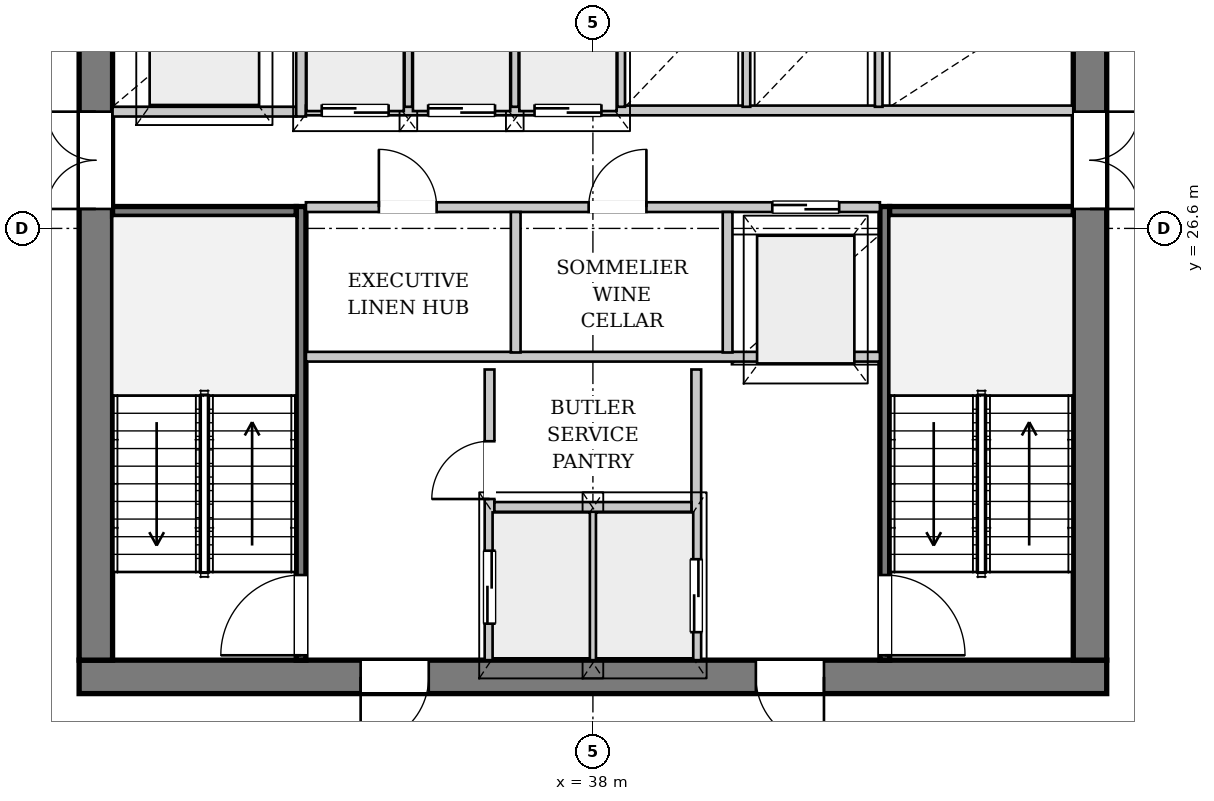
"""IFC4 building model, lengths in metres.
Left out: names, types, materials, properties, quantities, classifications, styles, units other than length and angle.
Written with IfcOpenShell. Run it as: python <this file> out.ifc"""

import sys

from ifc_helpers import new_model, si_unit, direction, frame, frame_2d, origin, place, context, subcontext, project, spatial, rectangle, extrude, source, transform, mapped, element, fill, save


model = new_model("IFC4")
c1 = context("Model", 3, precision=1e-05, world=origin(), true_north=direction((0.0, 1.0)))
c2 = subcontext(c1, "Body", "Model", "MODEL_VIEW")
j1 = project(units=[si_unit("LENGTHUNIT", "METRE"), si_unit("PLANEANGLEUNIT", "RADIAN")], contexts=[c1])
p1 = place(None, origin())
s1 = spatial("IfcSite", under=j1, at=p1, CompositionType="ELEMENT")
p2 = place(p1, origin())
s2 = spatial("IfcBuilding", under=s1, at=p2, CompositionType="ELEMENT")
p3 = place(p2, frame((0.0, 0.0, 182.1)))
s3 = spatial("IfcBuildingStorey", under=s2, at=p3, CompositionType="ELEMENT", Elevation=182.1)
p4 = place(p3, frame((53.031, 21.293, 0.0), z_axis=(0.0, 0.0, 1.0), x_axis=(-0.601886435851, -0.798581691713, 0.0)))
e1 = element("IfcWall", 1, at=p4, inside=s3, PredefinedType="SOLIDWALL", context=c2, shape_type="SweptSolid", body=[
    extrude(rectangle(XDim=23.316, YDim=0.32, at=frame_2d((11.658, 0.0))), origin(), (0.0, 0.0, 1.0), 2.722),
])
p5 = place(p4, frame((6.261, 0.0, 0.0)))
e2 = element("IfcOpeningElement", 2, at=p5, cuts=e1, PredefinedType="OPENING", context=c2, shape_type="SweptSolid", body=[
    extrude(rectangle(XDim=1.5, YDim=2.3, at=frame_2d((0.75, 1.15))), frame((0.0, 0.17, 0.0), z_axis=(0.0, -1.0, 0.0), x_axis=(1.0, 0.0, 0.0)), (0.0, 0.0, 1.0), 0.34),
])
p6 = place(p4, frame((15.954, 0.0, 0.252)))
e3 = element("IfcOpeningElement", 3, at=p6, cuts=e1, PredefinedType="OPENING", context=c2, shape_type="SweptSolid", body=[
    extrude(rectangle(XDim=2.6, YDim=2.35, at=frame_2d((1.3, 1.175))), frame((0.0, 0.17, 0.0), z_axis=(0.0, -1.0, 0.0), x_axis=(1.0, 0.0, 0.0)), (0.0, 0.0, 1.0), 0.34),
])
p7 = place(p3, frame((40.259, 2.746, 0.0), z_axis=(0.0, 0.0, 1.0), x_axis=(0.596468885173, 0.80263619967, 0.0)))
e4 = element("IfcWall", 4, at=p7, inside=s3, PredefinedType="PARAPET", context=c2, shape_type="SweptSolid", body=[
    extrude(rectangle(XDim=20.754, YDim=0.22, at=frame_2d((10.377, 0.0))), origin(), (0.0, 0.0, 1.0), 0.3),
])
p8 = place(p3, frame((46.45, 19.225, 0.0), z_axis=(0.0, 0.0, 1.0), x_axis=(-1.0, 0.0, 0.0)))
e5 = element("IfcWall", 5, at=p8, inside=s3, PredefinedType="SHEAR", context=c2, shape_type="SweptSolid", body=[
    extrude(rectangle(XDim=16.9, YDim=0.55, at=frame_2d((8.45, 0.0))), origin(), (0.0, 0.0, 1.0), 3.33),
])
p9 = place(p8, frame((4.65, 0.0, 0.0)))
e6 = element("IfcOpeningElement", 6, at=p9, cuts=e5, PredefinedType="OPENING", context=c2, shape_type="SweptSolid", body=[
    extrude(rectangle(XDim=1.12, YDim=2.25, at=frame_2d((0.56, 1.125))), frame((0.0, 0.285, 0.0), z_axis=(0.0, -1.0, 0.0), x_axis=(1.0, 0.0, 0.0)), (0.0, 0.0, 1.0), 0.57),
])
p10 = place(p8, frame((11.15, 0.0, 0.0)))
e7 = element("IfcOpeningElement", 7, at=p10, cuts=e5, PredefinedType="OPENING", context=c2, shape_type="SweptSolid", body=[
    extrude(rectangle(XDim=1.12, YDim=2.25, at=frame_2d((0.56, 1.125))), frame((0.0, 0.285, 0.0), z_axis=(0.0, -1.0, 0.0), x_axis=(1.0, 0.0, 0.0)), (0.0, 0.0, 1.0), 0.57),
])
p11 = place(p3, frame((29.825, 19.5, 0.0), z_axis=(0.0, 0.0, 1.0), x_axis=(0.0, 1.0, 0.0)))
e8 = element("IfcWall", 8, at=p11, inside=s3, PredefinedType="SHEAR", context=c2, shape_type="SweptSolid", body=[
    extrude(rectangle(XDim=14.2, YDim=0.55, at=frame_2d((7.1, 0.0))), origin(), (0.0, 0.0, 1.0), 3.33),
])
p12 = place(p11, frame((7.42, 0.0, 0.0)))
e9 = element("IfcOpeningElement", 9, at=p12, cuts=e8, PredefinedType="OPENING", context=c2, shape_type="SweptSolid", body=[
    extrude(rectangle(XDim=1.6, YDim=2.2, at=frame_2d((0.8, 1.1))), frame((0.0, 0.285, 0.0), z_axis=(0.0, -1.0, 0.0), x_axis=(1.0, 0.0, 0.0)), (0.0, 0.0, 1.0), 0.57),
])
p13 = place(p3, frame((46.175, 33.7, 0.0), z_axis=(0.0, 0.0, 1.0), x_axis=(0.0, -1.0, 0.0)))
e10 = element("IfcWall", 10, at=p13, inside=s3, PredefinedType="SHEAR", context=c2, shape_type="SweptSolid", body=[
    extrude(rectangle(XDim=14.2, YDim=0.55, at=frame_2d((7.1, 0.0))), origin(), (0.0, 0.0, 1.0), 3.33),
])
p14 = place(p13, frame((5.18, 0.0, 0.0)))
e11 = element("IfcOpeningElement", 11, at=p14, cuts=e10, PredefinedType="OPENING", context=c2, shape_type="SweptSolid", body=[
    extrude(rectangle(XDim=1.6, YDim=2.2, at=frame_2d((0.8, 1.1))), frame((0.0, 0.285, 0.0), z_axis=(0.0, -1.0, 0.0), x_axis=(1.0, 0.0, 0.0)), (0.0, 0.0, 1.0), 0.57),
])
p15 = place(p13, frame((2.05, 0.0, 0.0)))
e12 = element("IfcOpeningElement", 12, at=p15, cuts=e10, PredefinedType="OPENING", context=c2, shape_type="SweptSolid", body=[
    extrude(rectangle(XDim=0.95, YDim=2.1, at=frame_2d((0.475, 1.05))), frame((0.0, 0.285, 0.0), z_axis=(0.0, -1.0, 0.0), x_axis=(1.0, 0.0, 0.0)), (0.0, 0.0, 1.0), 0.57),
])
p16 = place(p3, frame((33.2, 19.5, 0.0), z_axis=(0.0, 0.0, 1.0), x_axis=(0.0, 1.0, 0.0)))
e13 = element("IfcWall", 13, at=p16, inside=s3, PredefinedType="PARTITIONING", context=c2, shape_type="SweptSolid", body=[
    extrude(rectangle(XDim=7.46, YDim=0.16, at=frame_2d((3.73, 0.0))), origin(), (0.0, 0.0, 1.0), 3.33),
])
p17 = place(p16, frame((0.08, 0.0, 0.0)))
e14 = element("IfcOpeningElement", 14, at=p17, cuts=e13, PredefinedType="OPENING", context=c2, shape_type="SweptSolid", body=[
    extrude(rectangle(XDim=1.32, YDim=2.2, at=frame_2d((0.66, 1.1))), frame((0.0, 0.09, 0.0), z_axis=(0.0, -1.0, 0.0), x_axis=(1.0, 0.0, 0.0)), (0.0, 0.0, 1.0), 0.18),
])
p18 = place(p3, frame((30.1, 26.88, 0.0), z_axis=(0.0, 0.0, 1.0), x_axis=(1.0, 0.0, 0.0)))
e15 = element("IfcWall", 15, at=p18, inside=s3, PredefinedType="PARTITIONING", context=c2, shape_type="SweptSolid", body=[
    extrude(rectangle(XDim=3.02, YDim=0.16, at=frame_2d((1.51, 0.0))), origin(), (0.0, 0.0, 1.0), 3.33),
])
p19 = place(p3, frame((42.8, 26.96, 0.0), z_axis=(0.0, 0.0, 1.0), x_axis=(0.0, -1.0, 0.0)))
e16 = element("IfcWall", 16, at=p19, inside=s3, PredefinedType="PARTITIONING", context=c2, shape_type="SweptSolid", body=[
    extrude(rectangle(XDim=7.46, YDim=0.16, at=frame_2d((3.73, 0.0))), origin(), (0.0, 0.0, 1.0), 3.33),
])
p20 = place(p19, frame((6.06, 0.0, 0.0)))
e17 = element("IfcOpeningElement", 17, at=p20, cuts=e16, PredefinedType="OPENING", context=c2, shape_type="SweptSolid", body=[
    extrude(rectangle(XDim=1.32, YDim=2.2, at=frame_2d((0.66, 1.1))), frame((0.0, 0.09, 0.0), z_axis=(0.0, -1.0, 0.0), x_axis=(1.0, 0.0, 0.0)), (0.0, 0.0, 1.0), 0.18),
])
p21 = place(p3, frame((42.88, 26.88, 0.0), z_axis=(0.0, 0.0, 1.0), x_axis=(1.0, 0.0, 0.0)))
e18 = element("IfcWall", 18, at=p21, inside=s3, PredefinedType="PARTITIONING", context=c2, shape_type="SweptSolid", body=[
    extrude(rectangle(XDim=3.02, YDim=0.16, at=frame_2d((1.51, 0.0))), origin(), (0.0, 0.0, 1.0), 3.33),
])
p22 = place(p3, frame((36.3, 19.5, 0.0), z_axis=(0.0, 0.0, 1.0), x_axis=(0.0, 1.0, 0.0)))
e19 = element("IfcWall", 19, at=p22, inside=s3, PredefinedType="PARTITIONING", context=c2, shape_type="SweptSolid", body=[
    extrude(rectangle(XDim=4.78, YDim=0.16, at=frame_2d((2.39, 0.0))), origin(), (0.0, 0.0, 1.0), 3.33),
])
p23 = place(p22, frame((0.6, 0.0, 0.0)))
e20 = element("IfcOpeningElement", 20, at=p23, cuts=e19, PredefinedType="OPENING", context=c2, shape_type="SweptSolid", body=[
    extrude(rectangle(XDim=1.2, YDim=2.2, at=frame_2d((0.6, 1.1))), frame((0.0, 0.09, 0.0), z_axis=(0.0, -1.0, 0.0), x_axis=(1.0, 0.0, 0.0)), (0.0, 0.0, 1.0), 0.18),
])
p24 = place(p22, frame((2.65, 0.0, 0.0)))
e21 = element("IfcOpeningElement", 21, at=p24, cuts=e19, PredefinedType="OPENING", context=c2, shape_type="SweptSolid", body=[
    extrude(rectangle(XDim=0.95, YDim=2.1, at=frame_2d((0.475, 1.05))), frame((0.0, 0.09, 0.0), z_axis=(0.0, -1.0, 0.0), x_axis=(1.0, 0.0, 0.0)), (0.0, 0.0, 1.0), 0.18),
])
p25 = place(p3, frame((39.7, 24.28, 0.0), z_axis=(0.0, 0.0, 1.0), x_axis=(0.0, -1.0, 0.0)))
e22 = element("IfcWall", 22, at=p25, inside=s3, PredefinedType="PARTITIONING", context=c2, shape_type="SweptSolid", body=[
    extrude(rectangle(XDim=4.78, YDim=0.16, at=frame_2d((2.39, 0.0))), origin(), (0.0, 0.0, 1.0), 3.33),
])
p26 = place(p25, frame((3.12, 0.0, 0.0)))
e23 = element("IfcOpeningElement", 23, at=p26, cuts=e22, PredefinedType="OPENING", context=c2, shape_type="SweptSolid", body=[
    extrude(rectangle(XDim=1.2, YDim=2.2, at=frame_2d((0.6, 1.1))), frame((0.0, 0.09, 0.0), z_axis=(0.0, -1.0, 0.0), x_axis=(1.0, 0.0, 0.0)), (0.0, 0.0, 1.0), 0.18),
])
p27 = place(p3, frame((38.0, 19.5, 0.0), z_axis=(0.0, 0.0, 1.0), x_axis=(0.0, 1.0, 0.0)))
e24 = element("IfcWall", 24, at=p27, inside=s3, PredefinedType="PARTITIONING", context=c2, shape_type="SweptSolid", body=[
    extrude(rectangle(XDim=2.46, YDim=0.125, at=frame_2d((1.23, 0.0))), origin(), (0.0, 0.0, 1.0), 3.33),
])
p28 = place(p3, frame((36.38, 22.02, 0.0), z_axis=(0.0, 0.0, 1.0), x_axis=(1.0, 0.0, 0.0)))
e25 = element("IfcWall", 25, at=p28, inside=s3, PredefinedType="PARTITIONING", context=c2, shape_type="SweptSolid", body=[
    extrude(rectangle(XDim=3.24, YDim=0.16, at=frame_2d((1.62, 0.0))), origin(), (0.0, 0.0, 1.0), 3.33),
])
p29 = place(p3, frame((33.28, 24.49, 0.0), z_axis=(0.0, 0.0, 1.0), x_axis=(1.0, 0.0, 0.0)))
e26 = element("IfcWall", 26, at=p29, inside=s3, PredefinedType="PARTITIONING", context=c2, shape_type="SweptSolid", body=[
    extrude(rectangle(XDim=9.44, YDim=0.16, at=frame_2d((4.72, 0.0))), origin(), (0.0, 0.0, 1.0), 3.33),
])
p30 = place(p3, frame((30.1, 28.52, 0.0), z_axis=(0.0, 0.0, 1.0), x_axis=(1.0, 0.0, 0.0)))
e27 = element("IfcWall", 27, at=p30, inside=s3, PredefinedType="PARTITIONING", context=c2, shape_type="SweptSolid", body=[
    extrude(rectangle(XDim=3.02, YDim=0.16, at=frame_2d((1.51, 0.0))), origin(), (0.0, 0.0, 1.0), 3.33),
])
p31 = place(p3, frame((33.2, 28.44, 0.0), z_axis=(0.0, 0.0, 1.0), x_axis=(0.0, 1.0, 0.0)))
e28 = element("IfcWall", 28, at=p31, inside=s3, PredefinedType="PARTITIONING", context=c2, shape_type="SweptSolid", body=[
    extrude(rectangle(XDim=5.26, YDim=0.16, at=frame_2d((2.63, 0.0))), origin(), (0.0, 0.0, 1.0), 3.33),
])
p32 = place(p3, frame((33.28, 26.95, 0.0), z_axis=(0.0, 0.0, 1.0), x_axis=(1.0, 0.0, 0.0)))
e29 = element("IfcWall", 29, at=p32, inside=s3, PredefinedType="PARTITIONING", context=c2, shape_type="SweptSolid", body=[
    extrude(rectangle(XDim=9.44, YDim=0.16, at=frame_2d((4.72, 0.0))), origin(), (0.0, 0.0, 1.0), 3.33),
])
p33 = place(p32, frame((1.2, 0.0, 0.0)))
e30 = element("IfcOpeningElement", 30, at=p33, cuts=e29, PredefinedType="OPENING", context=c2, shape_type="SweptSolid", body=[
    extrude(rectangle(XDim=0.95, YDim=2.1, at=frame_2d((0.475, 1.05))), frame((0.0, 0.09, 0.0), z_axis=(0.0, -1.0, 0.0), x_axis=(1.0, 0.0, 0.0)), (0.0, 0.0, 1.0), 0.18),
])
p34 = place(p32, frame((4.65, 0.0, 0.0)))
e31 = element("IfcOpeningElement", 31, at=p34, cuts=e29, PredefinedType="OPENING", context=c2, shape_type="SweptSolid", body=[
    extrude(rectangle(XDim=0.95, YDim=2.1, at=frame_2d((0.475, 1.05))), frame((0.0, 0.09, 0.0), z_axis=(0.0, -1.0, 0.0), x_axis=(1.0, 0.0, 0.0)), (0.0, 0.0, 1.0), 0.18),
])
p35 = place(p32, frame((7.67, 0.0, 0.0)))
e32 = element("IfcOpeningElement", 32, at=p35, cuts=e29, PredefinedType="OPENING", context=c2, shape_type="SweptSolid", body=[
    extrude(rectangle(XDim=1.1, YDim=2.2, at=frame_2d((0.55, 1.1))), frame((0.0, 0.09, 0.0), z_axis=(0.0, -1.0, 0.0), x_axis=(1.0, 0.0, 0.0)), (0.0, 0.0, 1.0), 0.18),
])
for number, where, z_axis, x_axis in (
    (33, (36.73, 24.56, 0.0), (0.0, 0.0, 1.0), (0.0, 1.0, 0.0)),
    (34, (40.215, 24.56, 0.0), (0.0, 0.0, 1.0), (0.0, 1.0, 0.0)),
):
    element("IfcWall", number, at=place(p3, frame(where, z_axis=z_axis, x_axis=x_axis)), inside=s3, PredefinedType="PARTITIONING", context=c2, shape_type="SweptSolid", body=[
        extrude(rectangle(XDim=2.31, YDim=0.16, at=frame_2d((1.155, 0.0))), origin(), (0.0, 0.0, 1.0), 3.33),
    ])
p36 = place(p3, frame((33.28, 28.54, 0.0), z_axis=(0.0, 0.0, 1.0), x_axis=(1.0, 0.0, 0.0)))
e35 = element("IfcWall", 35, at=p36, inside=s3, PredefinedType="PARTITIONING", context=c2, shape_type="SweptSolid", body=[
    extrude(rectangle(XDim=12.62, YDim=0.16, at=frame_2d((6.31, 0.0))), origin(), (0.0, 0.0, 1.0), 3.33),
])
p37 = place(p36, frame((0.26, 0.0, 0.0)))
e36 = element("IfcOpeningElement", 36, at=p37, cuts=e35, PredefinedType="OPENING", context=c2, shape_type="SweptSolid", body=[
    extrude(rectangle(XDim=1.1, YDim=2.2, at=frame_2d((0.55, 1.1))), frame((0.0, 0.09, 0.0), z_axis=(0.0, -1.0, 0.0), x_axis=(1.0, 0.0, 0.0)), (0.0, 0.0, 1.0), 0.18),
])
p38 = place(p36, frame((2.01, 0.0, 0.0)))
e37 = element("IfcOpeningElement", 37, at=p38, cuts=e35, PredefinedType="OPENING", context=c2, shape_type="SweptSolid", body=[
    extrude(rectangle(XDim=1.1, YDim=2.2, at=frame_2d((0.55, 1.1))), frame((0.0, 0.09, 0.0), z_axis=(0.0, -1.0, 0.0), x_axis=(1.0, 0.0, 0.0)), (0.0, 0.0, 1.0), 0.18),
])
p39 = place(p36, frame((3.76, 0.0, 0.0)))
e38 = element("IfcOpeningElement", 38, at=p39, cuts=e35, PredefinedType="OPENING", context=c2, shape_type="SweptSolid", body=[
    extrude(rectangle(XDim=1.1, YDim=2.2, at=frame_2d((0.55, 1.1))), frame((0.0, 0.09, 0.0), z_axis=(0.0, -1.0, 0.0), x_axis=(1.0, 0.0, 0.0)), (0.0, 0.0, 1.0), 0.18),
])
for number, where, z_axis, x_axis in (
    (39, (34.965, 28.6, 0.0), (0.0, 0.0, 1.0), (0.0, 1.0, 0.0)),
    (40, (36.715, 28.6, 0.0), (0.0, 0.0, 1.0), (0.0, 1.0, 0.0)),
    (41, (38.465, 28.6, 0.0), (0.0, 0.0, 1.0), (0.0, 1.0, 0.0)),
    (42, (40.525, 28.6, 0.0), (0.0, 0.0, 1.0), (0.0, 1.0, 0.0)),
    (43, (42.7, 28.6, 0.0), (0.0, 0.0, 1.0), (0.0, 1.0, 0.0)),
):
    element("IfcWall", number, at=place(p3, frame(where, z_axis=z_axis, x_axis=x_axis)), inside=s3, PredefinedType="PARTITIONING", context=c2, shape_type="SweptSolid", body=[
        extrude(rectangle(XDim=1.92, YDim=0.125, at=frame_2d((0.96, 0.0))), origin(), (0.0, 0.0, 1.0), 3.33),
    ])
m1 = source(origin(), c2, "Body", "SweptSolid", [
    extrude(rectangle(XDim=1.12, YDim=2.25, at=frame_2d((0.56, 1.125))), frame((0.0, 0.025, 0.0), z_axis=(0.0, -1.0, 0.0), x_axis=(1.0, 0.0, 0.0)), (0.0, 0.0, 1.0), 0.05),
])
p40 = place(p9, origin())
e44 = element("IfcDoor", 44, at=p40, inside=s3, OperationType="SINGLE_SWING_LEFT", PredefinedType="DOOR", context=c2, shape_type="MappedRepresentation", body=[
    mapped(m1, transform((0.0, 0.0, 0.0), x_axis=(1.0, 0.0, 0.0), y_axis=(0.0, 1.0, 0.0), z_axis=(0.0, 0.0, 1.0), scale=1.0)),
])
fill(e6, e44)
p41 = place(p10, origin())
e45 = element("IfcDoor", 45, at=p41, inside=s3, OperationType="SINGLE_SWING_RIGHT", PredefinedType="DOOR", context=c2, shape_type="MappedRepresentation", body=[
    mapped(m1, transform((0.0, 0.0, 0.0), x_axis=(1.0, 0.0, 0.0), y_axis=(0.0, 1.0, 0.0), z_axis=(0.0, 0.0, 1.0), scale=1.0)),
])
fill(e7, e45)
m2 = source(origin(), c2, "Body", "SweptSolid", [
    extrude(rectangle(XDim=1.6, YDim=2.2, at=frame_2d((0.8, 1.1))), frame((0.0, 0.025, 0.0), z_axis=(0.0, -1.0, 0.0), x_axis=(1.0, 0.0, 0.0)), (0.0, 0.0, 1.0), 0.05),
])
p42 = place(p12, origin())
e46 = element("IfcDoor", 46, at=p42, inside=s3, OperationType="DOUBLE_DOOR_SINGLE_SWING", PredefinedType="DOOR", context=c2, shape_type="MappedRepresentation", body=[
    mapped(m2, transform((0.0, 0.0, 0.0), x_axis=(1.0, 0.0, 0.0), y_axis=(0.0, 1.0, 0.0), z_axis=(0.0, 0.0, 1.0), scale=1.0)),
])
fill(e9, e46)
p43 = place(p14, origin())
e47 = element("IfcDoor", 47, at=p43, inside=s3, OperationType="DOUBLE_DOOR_SINGLE_SWING", PredefinedType="DOOR", context=c2, shape_type="MappedRepresentation", body=[
    mapped(m2, transform((0.0, 0.0, 0.0), x_axis=(1.0, 0.0, 0.0), y_axis=(0.0, 1.0, 0.0), z_axis=(0.0, 0.0, 1.0), scale=1.0)),
])
fill(e11, e47)
m3 = source(origin(), c2, "Body", "SweptSolid", [
    extrude(rectangle(XDim=1.32, YDim=2.2, at=frame_2d((0.66, 1.1))), frame((0.0, 0.025, 0.0), z_axis=(0.0, -1.0, 0.0), x_axis=(1.0, 0.0, 0.0)), (0.0, 0.0, 1.0), 0.05),
])
p44 = place(p17, origin())
e48 = element("IfcDoor", 48, at=p44, inside=s3, OperationType="SINGLE_SWING_LEFT", PredefinedType="DOOR", context=c2, shape_type="MappedRepresentation", body=[
    mapped(m3, transform((0.0, 0.0, 0.0), x_axis=(1.0, 0.0, 0.0), y_axis=(0.0, 1.0, 0.0), z_axis=(0.0, 0.0, 1.0), scale=1.0)),
])
fill(e14, e48)
p45 = place(p20, origin())
e49 = element("IfcDoor", 49, at=p45, inside=s3, OperationType="SINGLE_SWING_RIGHT", PredefinedType="DOOR", context=c2, shape_type="MappedRepresentation", body=[
    mapped(m3, transform((0.0, 0.0, 0.0), x_axis=(1.0, 0.0, 0.0), y_axis=(0.0, 1.0, 0.0), z_axis=(0.0, 0.0, 1.0), scale=1.0)),
])
fill(e17, e49)
m4 = source(origin(), c2, "Body", "SweptSolid", [
    extrude(rectangle(XDim=1.2, YDim=2.2, at=frame_2d((0.6, 1.1))), frame((0.0, 0.025, 0.0), z_axis=(0.0, -1.0, 0.0), x_axis=(1.0, 0.0, 0.0)), (0.0, 0.0, 1.0), 0.05),
])
p46 = place(p23, origin())
e50 = element("IfcDoor", 50, at=p46, inside=s3, OperationType="DOUBLE_DOOR_SLIDING", PredefinedType="DOOR", context=c2, shape_type="MappedRepresentation", body=[
    mapped(m4, transform((0.0, 0.0, 0.0), x_axis=(1.0, 0.0, 0.0), y_axis=(0.0, 1.0, 0.0), z_axis=(0.0, 0.0, 1.0), scale=1.0)),
])
fill(e20, e50)
m5 = source(origin(), c2, "Body", "SweptSolid", [
    extrude(rectangle(XDim=0.95, YDim=2.1, at=frame_2d((0.475, 1.05))), frame((0.0, 0.025, 0.0), z_axis=(0.0, -1.0, 0.0), x_axis=(1.0, 0.0, 0.0)), (0.0, 0.0, 1.0), 0.05),
])
p47 = place(p24, origin())
e51 = element("IfcDoor", 51, at=p47, inside=s3, OperationType="SINGLE_SWING_LEFT", PredefinedType="DOOR", context=c2, shape_type="MappedRepresentation", body=[
    mapped(m5, transform((0.0, 0.0, 0.0), x_axis=(1.0, 0.0, 0.0), y_axis=(0.0, 1.0, 0.0), z_axis=(0.0, 0.0, 1.0), scale=1.0)),
])
fill(e21, e51)
p48 = place(p26, origin())
e52 = element("IfcDoor", 52, at=p48, inside=s3, OperationType="DOUBLE_DOOR_SLIDING", PredefinedType="DOOR", context=c2, shape_type="MappedRepresentation", body=[
    mapped(m4, transform((0.0, 0.0, 0.0), x_axis=(1.0, 0.0, 0.0), y_axis=(0.0, 1.0, 0.0), z_axis=(0.0, 0.0, 1.0), scale=1.0)),
])
fill(e23, e52)
p49 = place(p33, origin())
e53 = element("IfcDoor", 53, at=p49, inside=s3, OperationType="SINGLE_SWING_LEFT", PredefinedType="DOOR", context=c2, shape_type="MappedRepresentation", body=[
    mapped(m5, transform((0.0, 0.0, 0.0), x_axis=(1.0, 0.0, 0.0), y_axis=(0.0, 1.0, 0.0), z_axis=(0.0, 0.0, 1.0), scale=1.0)),
])
fill(e30, e53)
p50 = place(p34, origin())
e54 = element("IfcDoor", 54, at=p50, inside=s3, OperationType="SINGLE_SWING_RIGHT", PredefinedType="DOOR", context=c2, shape_type="MappedRepresentation", body=[
    mapped(m5, transform((0.0, 0.0, 0.0), x_axis=(1.0, 0.0, 0.0), y_axis=(0.0, 1.0, 0.0), z_axis=(0.0, 0.0, 1.0), scale=1.0)),
])
fill(e31, e54)
m6 = source(origin(), c2, "Body", "SweptSolid", [
    extrude(rectangle(XDim=1.1, YDim=2.2, at=frame_2d((0.55, 1.1))), frame((0.0, 0.025, 0.0), z_axis=(0.0, -1.0, 0.0), x_axis=(1.0, 0.0, 0.0)), (0.0, 0.0, 1.0), 0.05),
])
p51 = place(p35, origin())
e55 = element("IfcDoor", 55, at=p51, inside=s3, OperationType="DOUBLE_DOOR_SLIDING", PredefinedType="DOOR", context=c2, shape_type="MappedRepresentation", body=[
    mapped(m6, transform((0.0, 0.0, 0.0), x_axis=(1.0, 0.0, 0.0), y_axis=(0.0, 1.0, 0.0), z_axis=(0.0, 0.0, 1.0), scale=1.0)),
])
fill(e32, e55)
p52 = place(p37, origin())
e56 = element("IfcDoor", 56, at=p52, inside=s3, OperationType="DOUBLE_DOOR_SLIDING", PredefinedType="DOOR", context=c2, shape_type="MappedRepresentation", body=[
    mapped(m6, transform((0.0, 0.0, 0.0), x_axis=(1.0, 0.0, 0.0), y_axis=(0.0, 1.0, 0.0), z_axis=(0.0, 0.0, 1.0), scale=1.0)),
])
fill(e36, e56)
p53 = place(p38, origin())
e57 = element("IfcDoor", 57, at=p53, inside=s3, OperationType="DOUBLE_DOOR_SLIDING", PredefinedType="DOOR", context=c2, shape_type="MappedRepresentation", body=[
    mapped(m6, transform((0.0, 0.0, 0.0), x_axis=(1.0, 0.0, 0.0), y_axis=(0.0, 1.0, 0.0), z_axis=(0.0, 0.0, 1.0), scale=1.0)),
])
fill(e37, e57)
p54 = place(p39, origin())
e58 = element("IfcDoor", 58, at=p54, inside=s3, OperationType="DOUBLE_DOOR_SLIDING", PredefinedType="DOOR", context=c2, shape_type="MappedRepresentation", body=[
    mapped(m6, transform((0.0, 0.0, 0.0), x_axis=(1.0, 0.0, 0.0), y_axis=(0.0, 1.0, 0.0), z_axis=(0.0, 0.0, 1.0), scale=1.0)),
])
fill(e38, e58)
save(model, sys.argv[1])
